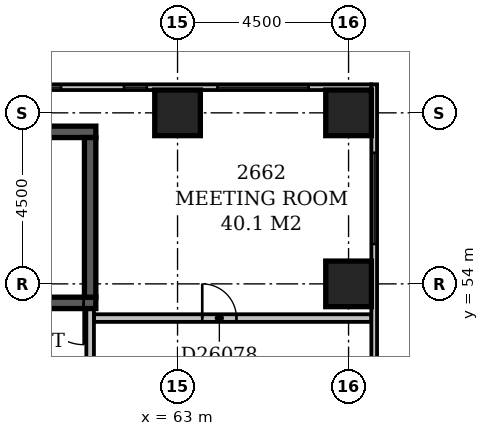
"""IFC4 building model, lengths in metres.
Left out: names, types, materials, properties, quantities, classifications, styles, units other than length and angle.
Written with IfcOpenShell. Run it as: python <this file> out.ifc"""

import sys

from ifc_helpers import new_model, si_unit, direction, frame, frame_2d, origin, origin_2d, place, context, subcontext, project, spatial, rectangle, extrude, element, fill, save


model = new_model("IFC4")
c1 = context("Model", 3, precision=1e-05, world=origin(), true_north=direction((0.0, 1.0)))
c2 = subcontext(c1, "Body", "Model", "MODEL_VIEW")
j1 = project(units=[si_unit("LENGTHUNIT", "METRE"), si_unit("PLANEANGLEUNIT", "RADIAN")], contexts=[c1])
p1 = place(None, origin())
s1 = spatial("IfcSite", under=j1, at=p1, CompositionType="ELEMENT")
p2 = place(p1, origin())
s2 = spatial("IfcBuilding", under=s1, at=p2, CompositionType="ELEMENT")
p3 = place(p2, frame((0.0, 0.0, 104.6)))
s3 = spatial("IfcBuildingStorey", under=s2, at=p3, CompositionType="ELEMENT", Elevation=104.6)
p4 = place(p3, frame((53.85, 53.5, -0.3), z_axis=(0.0, 0.0, 1.0), x_axis=(1.0, 0.0, 0.0)))
e1 = element("IfcWall", 1, at=p4, inside=s3, PredefinedType="SHEAR", context=c2, shape_type="SweptSolid", body=[
    extrude(rectangle(XDim=7.0, YDim=0.3, at=frame_2d((3.5, 0.0))), origin(), (0.0, 0.0, 1.0), 3.45),
])
p5 = place(p4, frame((5.58, 0.0, 0.3)))
e2 = element("IfcOpeningElement", 2, at=p5, cuts=e1, PredefinedType="OPENING", context=c2, shape_type="SweptSolid", body=[
    extrude(rectangle(XDim=1.1, YDim=2.1, at=frame_2d((0.55, 1.05))), frame((0.0, 0.162, 0.0), z_axis=(0.0, -1.0, 0.0), x_axis=(1.0, 0.0, 0.0)), (0.0, 0.0, 1.0), 0.324),
])
p6 = place(p3, frame((53.85, 58.0, -0.3), z_axis=(0.0, 0.0, 1.0), x_axis=(1.0, 0.0, 0.0)))
e3 = element("IfcWall", 3, at=p6, inside=s3, PredefinedType="SHEAR", context=c2, shape_type="SweptSolid", body=[
    extrude(rectangle(XDim=7.0, YDim=0.3, at=frame_2d((3.5, 0.0))), origin(), (0.0, 0.0, 1.0), 3.45),
])
p7 = place(p3, frame((60.7, 53.65, -0.3), z_axis=(0.0, 0.0, 1.0), x_axis=(0.0, 1.0, 0.0)))
e4 = element("IfcWall", 4, at=p7, inside=s3, PredefinedType="SHEAR", context=c2, shape_type="SweptSolid", body=[
    extrude(rectangle(XDim=4.2, YDim=0.3, at=frame_2d((2.1, 0.0))), origin(), (0.0, 0.0, 1.0), 3.45),
])
for number, where, z_axis, x_axis in (
    (5, (67.5, 54.0, -0.3), (0.0, 0.0, 1.0), (1.0, 0.0, 0.0)),
    (6, (63.0, 58.5, -0.3), (0.0, 0.0, 1.0), (1.0, 0.0, 0.0)),
    (7, (67.5, 58.5, -0.3), (0.0, 0.0, 1.0), (1.0, 0.0, 0.0)),
):
    element("IfcColumn", number, at=place(p3, frame(where, z_axis=z_axis, x_axis=x_axis)), inside=s3, PredefinedType="COLUMN", context=c2, shape_type="SweptSolid", body=[
        extrude(rectangle(XDim=1.2, YDim=1.2, at=origin_2d()), origin(), (0.0, 0.0, 1.0), 3.45),
    ])
p8 = place(p3, frame((68.175, 35.4, 0.0), z_axis=(0.0, 0.0, 1.0), x_axis=(0.0, 1.0, 0.0)))
e8 = element("IfcWall", 8, at=p8, inside=s3, PredefinedType="STANDARD", context=c2, shape_type="SweptSolid", body=[
    extrude(rectangle(XDim=23.85, YDim=0.15, at=frame_2d((11.925, 0.0))), origin(), (0.0, 0.0, 1.0), 2.5),
])
p9 = place(p8, frame((1.65, 0.0, 0.6)))
e9 = element("IfcOpeningElement", 9, at=p9, cuts=e8, PredefinedType="OPENING", context=c2, shape_type="SweptSolid", body=[
    extrude(rectangle(XDim=2.4, YDim=1.8, at=frame_2d((1.2, 0.9))), frame((0.0, 0.087, 0.0), z_axis=(0.0, -1.0, 0.0), x_axis=(1.0, 0.0, 0.0)), (0.0, 0.0, 1.0), 0.174),
])
p10 = place(p8, frame((10.65, 0.0, 0.6)))
e10 = element("IfcOpeningElement", 10, at=p10, cuts=e8, PredefinedType="OPENING", context=c2, shape_type="SweptSolid", body=[
    extrude(rectangle(XDim=2.4, YDim=1.8, at=frame_2d((1.2, 0.9))), frame((0.0, 0.087, 0.0), z_axis=(0.0, -1.0, 0.0), x_axis=(1.0, 0.0, 0.0)), (0.0, 0.0, 1.0), 0.174),
])
p11 = place(p8, frame((19.65, 0.0, 0.6)))
e11 = element("IfcOpeningElement", 11, at=p11, cuts=e8, PredefinedType="OPENING", context=c2, shape_type="SweptSolid", body=[
    extrude(rectangle(XDim=2.4, YDim=1.8, at=frame_2d((1.2, 0.9))), frame((0.0, 0.087, 0.0), z_axis=(0.0, -1.0, 0.0), x_axis=(1.0, 0.0, 0.0)), (0.0, 0.0, 1.0), 0.174),
])
p12 = place(p3, frame((68.1, 59.175, 0.0), z_axis=(0.0, 0.0, 1.0), x_axis=(-1.0, 0.0, 0.0)))
e12 = element("IfcWall", 12, at=p12, inside=s3, PredefinedType="STANDARD", context=c2, shape_type="SweptSolid", body=[
    extrude(rectangle(XDim=68.85, YDim=0.15, at=frame_2d((34.425, 0.0))), origin(), (0.0, 0.0, 1.0), 2.5),
])
p13 = place(p12, frame((1.65, 0.0, 0.6)))
e13 = element("IfcOpeningElement", 13, at=p13, cuts=e12, PredefinedType="OPENING", context=c2, shape_type="SweptSolid", body=[
    extrude(rectangle(XDim=2.4, YDim=1.8, at=frame_2d((1.2, 0.9))), frame((0.0, 0.087, 0.0), z_axis=(0.0, -1.0, 0.0), x_axis=(1.0, 0.0, 0.0)), (0.0, 0.0, 1.0), 0.174),
])
p14 = place(p12, frame((5.908, 0.0, 0.6)))
e14 = element("IfcOpeningElement", 14, at=p14, cuts=e12, PredefinedType="OPENING", context=c2, shape_type="SweptSolid", body=[
    extrude(rectangle(XDim=0.6, YDim=1.8, at=frame_2d((0.3, 0.9))), frame((0.0, 0.087, 0.0), z_axis=(0.0, -1.0, 0.0), x_axis=(1.0, 0.0, 0.0)), (0.0, 0.0, 1.0), 0.174),
])
p15 = place(p12, frame((8.166, 0.0, 0.6)))
e15 = element("IfcOpeningElement", 15, at=p15, cuts=e12, PredefinedType="OPENING", context=c2, shape_type="SweptSolid", body=[
    extrude(rectangle(XDim=0.6, YDim=1.8, at=frame_2d((0.3, 0.9))), frame((0.0, 0.087, 0.0), z_axis=(0.0, -1.0, 0.0), x_axis=(1.0, 0.0, 0.0)), (0.0, 0.0, 1.0), 0.174),
])
p16 = place(p3, frame((60.7, 51.6, 0.0), z_axis=(0.0, 0.0, 1.0), x_axis=(0.0, 1.0, 0.0)))
e16 = element("IfcWall", 16, at=p16, inside=s3, PredefinedType="PARTITIONING", context=c2, shape_type="SweptSolid", body=[
    extrude(rectangle(XDim=1.73, YDim=0.2, at=frame_2d((0.865, 0.0))), origin(), (0.0, 0.0, 1.0), 3.15),
])
p17 = place(p3, frame((60.8, 53.1, 0.0), z_axis=(0.0, 0.0, 1.0), x_axis=(1.0, 0.0, 0.0)))
e17 = element("IfcWall", 17, at=p17, inside=s3, PredefinedType="PARTITIONING", context=c2, shape_type="SweptSolid", body=[
    extrude(rectangle(XDim=7.3, YDim=0.2, at=frame_2d((3.65, 0.0))), origin(), (0.0, 0.0, 1.0), 3.15),
])
p18 = place(p17, frame((2.85, 0.0, 0.0)))
e18 = element("IfcOpeningElement", 18, at=p18, cuts=e17, PredefinedType="OPENING", context=c2, shape_type="SweptSolid", body=[
    extrude(rectangle(XDim=0.9, YDim=2.1, at=frame_2d((0.45, 1.05))), frame((0.0, 0.112, 0.0), z_axis=(0.0, -1.0, 0.0), x_axis=(1.0, 0.0, 0.0)), (0.0, 0.0, 1.0), 0.224),
])
p19 = place(p11, origin())
e19 = element("IfcWindow", 19, at=p19, inside=s3, PartitioningType="SINGLE_PANEL", PredefinedType="WINDOW", context=c2, shape_type="SweptSolid", body=[
    extrude(rectangle(XDim=2.4, YDim=1.8, at=frame_2d((1.2, 0.9))), frame((0.0, 0.03, 0.0), z_axis=(0.0, -1.0, 0.0), x_axis=(1.0, 0.0, 0.0)), (0.0, 0.0, 1.0), 0.06),
])
fill(e11, e19)
p20 = place(p13, origin())
e20 = element("IfcWindow", 20, at=p20, inside=s3, PartitioningType="SINGLE_PANEL", PredefinedType="WINDOW", context=c2, shape_type="SweptSolid", body=[
    extrude(rectangle(XDim=2.4, YDim=1.8, at=frame_2d((1.2, 0.9))), frame((0.0, 0.03, 0.0), z_axis=(0.0, -1.0, 0.0), x_axis=(1.0, 0.0, 0.0)), (0.0, 0.0, 1.0), 0.06),
])
fill(e13, e20)
p21 = place(p14, origin())
e21 = element("IfcWindow", 21, at=p21, inside=s3, PartitioningType="SINGLE_PANEL", PredefinedType="WINDOW", context=c2, shape_type="SweptSolid", body=[
    extrude(rectangle(XDim=0.6, YDim=1.8, at=frame_2d((0.3, 0.9))), frame((0.0, 0.03, 0.0), z_axis=(0.0, -1.0, 0.0), x_axis=(1.0, 0.0, 0.0)), (0.0, 0.0, 1.0), 0.06),
])
fill(e14, e21)
p22 = place(p15, origin())
e22 = element("IfcWindow", 22, at=p22, inside=s3, PartitioningType="SINGLE_PANEL", PredefinedType="WINDOW", context=c2, shape_type="SweptSolid", body=[
    extrude(rectangle(XDim=0.6, YDim=1.8, at=frame_2d((0.3, 0.9))), frame((0.0, 0.03, 0.0), z_axis=(0.0, -1.0, 0.0), x_axis=(1.0, 0.0, 0.0)), (0.0, 0.0, 1.0), 0.06),
])
fill(e15, e22)
p23 = place(p5, origin())
e23 = element("IfcDoor", 23, at=p23, inside=s3, OperationType="SINGLE_SWING_RIGHT", PredefinedType="DOOR", context=c2, shape_type="SweptSolid", body=[
    extrude(rectangle(XDim=1.1, YDim=2.1, at=frame_2d((0.55, 1.05))), frame((0.0, 0.025, 0.0), z_axis=(0.0, -1.0, 0.0), x_axis=(1.0, 0.0, 0.0)), (0.0, 0.0, 1.0), 0.05),
])
fill(e2, e23)
p24 = place(p18, origin())
e24 = element("IfcDoor", 24, at=p24, inside=s3, OperationType="SINGLE_SWING_LEFT", PredefinedType="DOOR", context=c2, shape_type="SweptSolid", body=[
    extrude(rectangle(XDim=0.9, YDim=2.1, at=frame_2d((0.45, 1.05))), frame((0.0, 0.025, 0.0), z_axis=(0.0, -1.0, 0.0), x_axis=(1.0, 0.0, 0.0)), (0.0, 0.0, 1.0), 0.05),
])
fill(e18, e24)
save(model, sys.argv[1])
